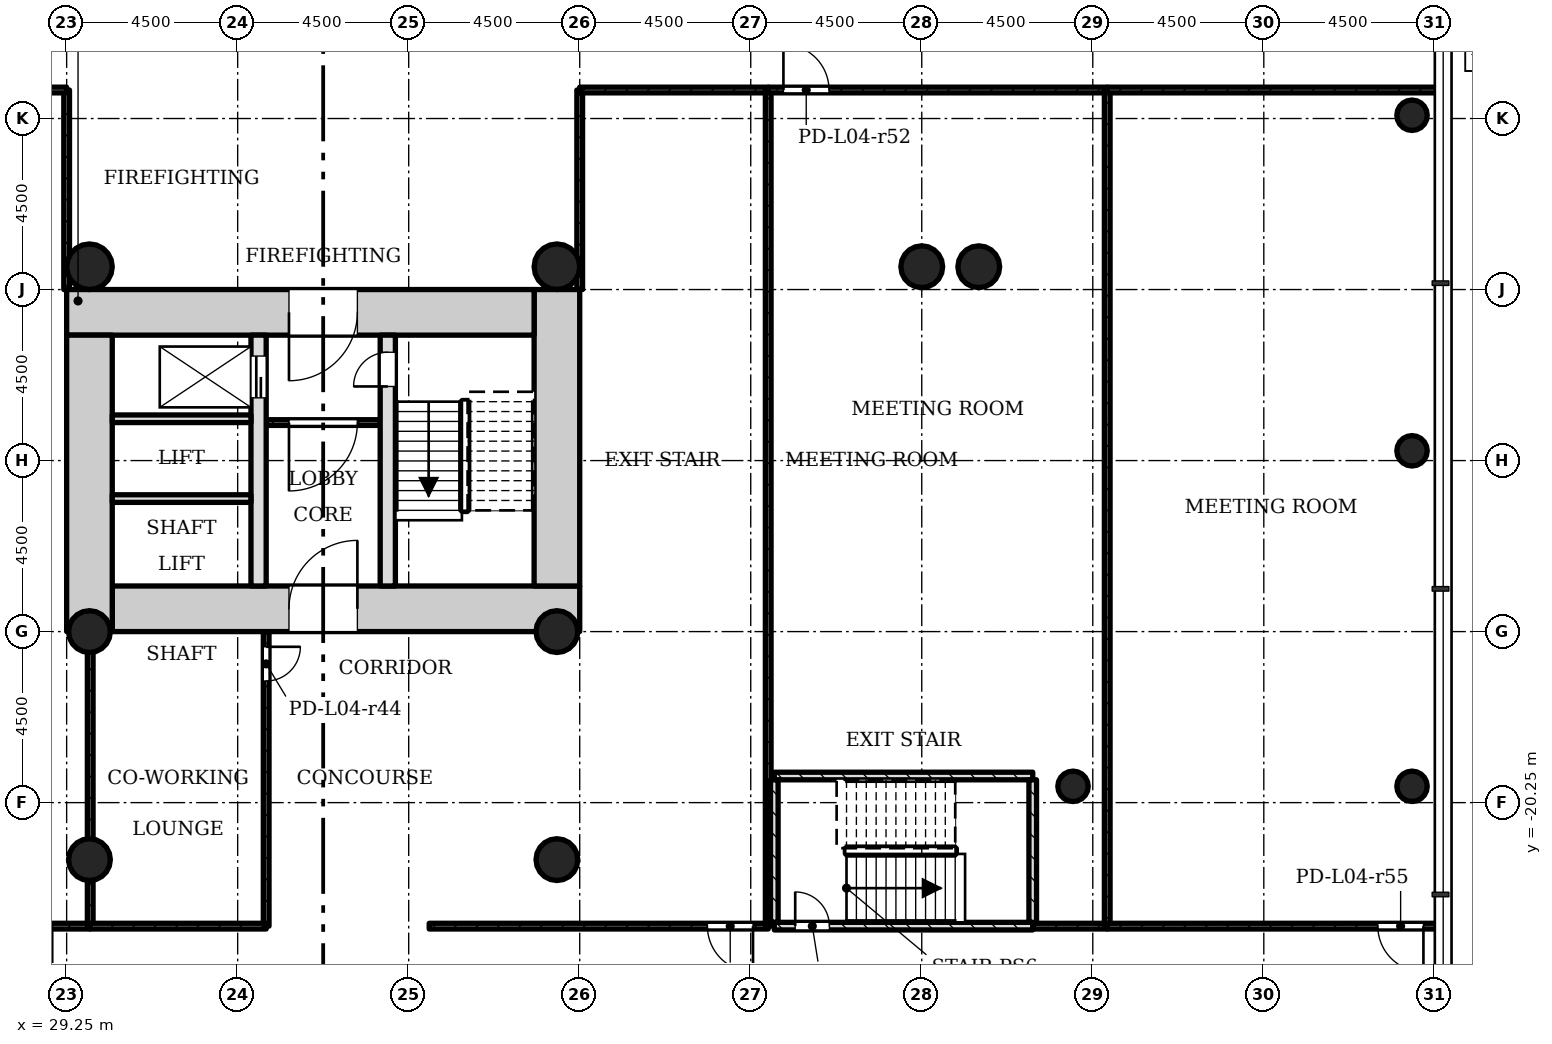
"""IFC4 building model, lengths in metres.
Left out: names, types, materials, properties, quantities, classifications, styles, units other than length and angle.
Written with IfcOpenShell. Run it as: python <this file> out.ifc"""

import sys

from ifc_helpers import new_model, si_unit, direction, frame, frame_2d, origin, origin_2d, place, context, subcontext, project, spatial, rectangle, hollow_circle, extrude, element, fill, save


model = new_model("IFC4")
c1 = context("Model", 3, precision=1e-05, world=origin(), true_north=direction((0.0, 1.0)))
c2 = subcontext(c1, "Body", "Model", "MODEL_VIEW")
j1 = project(units=[si_unit("LENGTHUNIT", "METRE"), si_unit("PLANEANGLEUNIT", "RADIAN")], contexts=[c1])
p1 = place(None, origin())
s1 = spatial("IfcSite", under=j1, at=p1, CompositionType="ELEMENT")
p2 = place(p1, origin())
s2 = spatial("IfcBuilding", under=s1, at=p2, CompositionType="ELEMENT")
p3 = place(p2, frame((0.0, 0.0, 20.0)))
s3 = spatial("IfcBuildingStorey", under=s2, at=p3, CompositionType="ELEMENT", Elevation=20.0)
p4 = place(p3, frame((30.45, -15.15, 0.0), z_axis=(0.0, 0.0, 1.0), x_axis=(1.0, 0.0, 0.0)))
e1 = element("IfcWall", 1, at=p4, inside=s3, PredefinedType="SHEAR", context=c2, shape_type="SweptSolid", body=[
    extrude(rectangle(XDim=12.3, YDim=1.2, at=frame_2d((6.15, 0.0))), origin(), (0.0, 0.0, 1.0), 4.5),
])
p5 = place(p4, frame((4.65, 0.0, 0.0)))
e2 = element("IfcOpeningElement", 2, at=p5, cuts=e1, PredefinedType="OPENING", context=c2, shape_type="SweptSolid", body=[
    extrude(rectangle(XDim=1.8, YDim=2.1, at=frame_2d((0.9, 1.05))), frame((0.0, 0.61, 0.0), z_axis=(0.0, -1.0, 0.0), x_axis=(1.0, 0.0, 0.0)), (0.0, 0.0, 1.0), 1.22),
])
p6 = place(p3, frame((42.15, -14.55, 0.0), z_axis=(0.0, 0.0, 1.0), x_axis=(0.0, 1.0, 0.0)))
e3 = element("IfcWall", 3, at=p6, inside=s3, PredefinedType="SHEAR", context=c2, shape_type="SweptSolid", body=[
    extrude(rectangle(XDim=7.8, YDim=1.2, at=frame_2d((3.9, 0.0))), origin(), (0.0, 0.0, 1.0), 4.5),
])
p7 = place(p3, frame((41.55, -7.35, 0.0), z_axis=(0.0, 0.0, 1.0), x_axis=(-1.0, 0.0, 0.0)))
e4 = element("IfcWall", 4, at=p7, inside=s3, PredefinedType="SHEAR", context=c2, shape_type="SweptSolid", body=[
    extrude(rectangle(XDim=12.3, YDim=1.2, at=frame_2d((6.15, 0.0))), origin(), (0.0, 0.0, 1.0), 4.5),
])
p8 = place(p7, frame((4.65, 0.0, 0.0)))
e5 = element("IfcOpeningElement", 5, at=p8, cuts=e4, PredefinedType="OPENING", context=c2, shape_type="SweptSolid", body=[
    extrude(rectangle(XDim=1.8, YDim=2.1, at=frame_2d((0.9, 1.05))), frame((0.0, 0.61, 0.0), z_axis=(0.0, -1.0, 0.0), x_axis=(1.0, 0.0, 0.0)), (0.0, 0.0, 1.0), 1.22),
])
p9 = place(p3, frame((29.85, -7.95, 0.0), z_axis=(0.0, 0.0, 1.0), x_axis=(0.0, -1.0, 0.0)))
e6 = element("IfcWall", 6, at=p9, inside=s3, PredefinedType="SHEAR", context=c2, shape_type="SweptSolid", body=[
    extrude(rectangle(XDim=7.8, YDim=1.2, at=frame_2d((3.9, 0.0))), origin(), (0.0, 0.0, 1.0), 4.5),
])
p10 = place(p3, frame((34.3, -14.55, 0.0), z_axis=(0.0, 0.0, 1.0), x_axis=(0.0, 1.0, 0.0)))
e7 = element("IfcWall", 7, at=p10, inside=s3, PredefinedType="SHEAR", context=c2, shape_type="SweptSolid", body=[
    extrude(rectangle(XDim=6.6, YDim=0.4, at=frame_2d((3.3, 0.0))), origin(), (0.0, 0.0, 1.0), 4.5),
])
p11 = place(p10, frame((4.95, 0.0, 0.0)))
e8 = element("IfcOpeningElement", 8, at=p11, cuts=e7, PredefinedType="OPENING", context=c2, shape_type="SweptSolid", body=[
    extrude(rectangle(XDim=1.1, YDim=2.1, at=frame_2d((0.55, 1.05))), frame((0.0, 0.21, 0.0), z_axis=(0.0, -1.0, 0.0), x_axis=(1.0, 0.0, 0.0)), (0.0, 0.0, 1.0), 0.42),
])
p12 = place(p3, frame((37.7, -14.55, 0.0), z_axis=(0.0, 0.0, 1.0), x_axis=(0.0, 1.0, 0.0)))
e9 = element("IfcWall", 9, at=p12, inside=s3, PredefinedType="SHEAR", context=c2, shape_type="SweptSolid", body=[
    extrude(rectangle(XDim=6.6, YDim=0.4, at=frame_2d((3.3, 0.0))), origin(), (0.0, 0.0, 1.0), 4.5),
])
p13 = place(p12, frame((5.25, 0.0, 0.0)))
e10 = element("IfcOpeningElement", 10, at=p13, cuts=e9, PredefinedType="OPENING", context=c2, shape_type="SweptSolid", body=[
    extrude(rectangle(XDim=0.9, YDim=2.1, at=frame_2d((0.45, 1.05))), frame((0.0, 0.21, 0.0), z_axis=(0.0, -1.0, 0.0), x_axis=(1.0, 0.0, 0.0)), (0.0, 0.0, 1.0), 0.42),
])
for number, where, z_axis, x_axis in (
    (11, (42.15, -15.75, 0.0), (0.0, 0.0, 1.0), (1.0, 0.0, 0.0)),
    (12, (29.85, -15.75, 0.0), (0.0, 0.0, 1.0), (1.0, 0.0, 0.0)),
    (13, (42.15, -21.75, 0.0), (0.0, 0.0, 1.0), (1.0, 0.0, 0.0)),
    (14, (29.85, -21.75, 0.0), (0.0, 0.0, 1.0), (1.0, 0.0, 0.0)),
    (15, (51.75, -6.15, 0.0), (0.0, 0.0, 1.0), (1.0, 0.0, 0.0)),
    (16, (53.25, -6.15, 0.0), (0.0, 0.0, 1.0), (1.0, 0.0, 0.0)),
):
    element("IfcColumn", number, at=place(p3, frame(where, z_axis=z_axis, x_axis=x_axis)), inside=s3, PredefinedType="COLUMN", context=c2, shape_type="SweptSolid", body=[
        extrude(hollow_circle(Radius=0.55, WallThickness=0.04, at=origin_2d()), origin(), (0.0, 0.0, 1.0), 4.5),
    ])
for number, where, z_axis, x_axis in (
    (17, (42.15, -6.15, 0.0), (0.0, 0.0, 1.0), (1.0, 0.0, 0.0)),
    (18, (29.85, -6.15, 0.0), (0.0, 0.0, 1.0), (1.0, 0.0, 0.0)),
):
    element("IfcColumn", number, at=place(p3, frame(where, z_axis=z_axis, x_axis=x_axis)), inside=s3, PredefinedType="COLUMN", context=c2, shape_type="SweptSolid", body=[
        extrude(hollow_circle(Radius=0.6, WallThickness=0.045, at=origin_2d()), origin(), (0.0, 0.0, 1.0), 4.5),
    ])
for number, where, z_axis, x_axis in (
    (19, (55.73, -19.821, 0.0), (0.0, 0.0, 1.0), (1.0, 0.0, 0.0)),
    (20, (64.65, -19.821, 0.0), (0.0, 0.0, 1.0), (1.0, 0.0, 0.0)),
    (21, (64.65, -10.993, 0.0), (0.0, 0.0, 1.0), (1.0, 0.0, 0.0)),
    (22, (64.65, -2.164, 0.0), (0.0, 0.0, 1.0), (1.0, 0.0, 0.0)),
):
    element("IfcColumn", number, at=place(p3, frame(where, z_axis=z_axis, x_axis=x_axis)), inside=s3, PredefinedType="COLUMN", context=c2, shape_type="SweptSolid", body=[
        extrude(hollow_circle(Radius=0.4, WallThickness=0.028, at=origin_2d()), origin(), (0.0, 0.0, 1.0), 4.08),
    ])
p14 = place(p3, frame((34.5, -10.25, 0.0), z_axis=(0.0, 0.0, 1.0), x_axis=(1.0, 0.0, 0.0)))
e23 = element("IfcWall", 23, at=p14, inside=s3, PredefinedType="PARTITIONING", context=c2, shape_type="SweptSolid", body=[
    extrude(rectangle(XDim=3.0, YDim=0.15, at=frame_2d((1.5, 0.0))), origin(), (0.0, 0.0, 1.0), 4.075),
])
p15 = place(p14, frame((0.6, 0.0, 0.0)))
e24 = element("IfcOpeningElement", 24, at=p15, cuts=e23, PredefinedType="OPENING", context=c2, shape_type="SweptSolid", body=[
    extrude(rectangle(XDim=1.8, YDim=2.1, at=frame_2d((0.9, 1.05))), frame((0.0, 0.085, 0.0), z_axis=(0.0, -1.0, 0.0), x_axis=(1.0, 0.0, 0.0)), (0.0, 0.0, 1.0), 0.17),
])
for number, where, z_axis, x_axis in (
    (25, (30.45, -10.15, 0.0), (0.0, 0.0, 1.0), (1.0, 0.0, 0.0)),
    (26, (30.45, -12.25, 0.0), (0.0, 0.0, 1.0), (1.0, 0.0, 0.0)),
):
    element("IfcWall", number, at=place(p3, frame(where, z_axis=z_axis, x_axis=x_axis)), inside=s3, PredefinedType="SOLIDWALL", context=c2, shape_type="SweptSolid", body=[
        extrude(rectangle(XDim=3.65, YDim=0.2, at=frame_2d((1.825, 0.0))), origin(), (0.0, 0.0, 1.0), 4.075),
    ])
p16 = place(p3, frame((29.25, -1.5, 0.0), z_axis=(0.0, 0.0, 1.0), x_axis=(0.0, -1.0, 0.0)))
e27 = element("IfcWall", 27, at=p16, inside=s3, PredefinedType="PARTITIONING", context=c2, shape_type="SweptSolid", body=[
    extrude(rectangle(XDim=5.25, YDim=0.15, at=frame_2d((2.625, 0.0))), origin(), (0.0, 0.0, 1.0), 4.075),
])
p17 = place(p3, frame((29.87, -23.5, 0.0), z_axis=(0.0, 0.0, 1.0), x_axis=(-1.0, 0.0, 0.0)))
e28 = element("IfcWall", 28, at=p17, inside=s3, PredefinedType="PARTITIONING", context=c2, shape_type="SweptSolid", body=[
    extrude(rectangle(XDim=8.92, YDim=0.15, at=frame_2d((4.46, 0.0))), origin(), (0.0, 0.0, 1.0), 4.075),
])
p18 = place(p17, frame((1.0, 0.0, 0.0)))
e29 = element("IfcOpeningElement", 29, at=p18, cuts=e28, PredefinedType="OPENING", context=c2, shape_type="SweptSolid", body=[
    extrude(rectangle(XDim=1.2, YDim=2.1, at=frame_2d((0.6, 1.05))), frame((0.0, 0.085, 0.0), z_axis=(0.0, -1.0, 0.0), x_axis=(1.0, 0.0, 0.0)), (0.0, 0.0, 1.0), 0.17),
])
p19 = place(p3, frame((20.95, -1.5, 0.0), z_axis=(0.0, 0.0, 1.0), x_axis=(1.0, 0.0, 0.0)))
e30 = element("IfcWall", 30, at=p19, inside=s3, PredefinedType="PARTITIONING", context=c2, shape_type="SweptSolid", body=[
    extrude(rectangle(XDim=8.3, YDim=0.15, at=frame_2d((4.15, 0.0))), origin(), (0.0, 0.0, 1.0), 4.075),
])
p20 = place(p3, frame((29.87, -15.75, 0.0), z_axis=(0.0, 0.0, 1.0), x_axis=(0.0, -1.0, 0.0)))
e31 = element("IfcWall", 31, at=p20, inside=s3, PredefinedType="PARTITIONING", context=c2, shape_type="SweptSolid", body=[
    extrude(rectangle(XDim=6.0, YDim=0.15, at=frame_2d((3.0, 0.0))), origin(), (0.0, 0.0, 1.0), 3.65),
])
p21 = place(p3, frame((29.87, -21.75, 0.0), z_axis=(0.0, 0.0, 1.0), x_axis=(0.0, -1.0, 0.0)))
e32 = element("IfcWall", 32, at=p21, inside=s3, PredefinedType="PARTITIONING", context=c2, shape_type="SweptSolid", body=[
    extrude(rectangle(XDim=1.75, YDim=0.15, at=frame_2d((0.875, 0.0))), origin(), (0.0, 0.0, 1.0), 4.075),
])
p22 = place(p3, frame((34.5, -15.75, 0.0), z_axis=(0.0, 0.0, 1.0), x_axis=(0.0, -1.0, 0.0)))
e33 = element("IfcWall", 33, at=p22, inside=s3, PredefinedType="PARTITIONING", context=c2, shape_type="SweptSolid", body=[
    extrude(rectangle(XDim=7.75, YDim=0.15, at=frame_2d((3.875, 0.0))), origin(), (0.0, 0.0, 1.0), 4.075),
])
p23 = place(p22, frame((0.4, 0.0, 0.0)))
e34 = element("IfcOpeningElement", 34, at=p23, cuts=e33, PredefinedType="OPENING", context=c2, shape_type="SweptSolid", body=[
    extrude(rectangle(XDim=0.9, YDim=2.1, at=frame_2d((0.45, 1.05))), frame((0.0, 0.085, 0.0), z_axis=(0.0, -1.0, 0.0), x_axis=(1.0, 0.0, 0.0)), (0.0, 0.0, 1.0), 0.17),
])
p24 = place(p3, frame((34.5, -23.5, 0.0), z_axis=(0.0, 0.0, 1.0), x_axis=(-1.0, 0.0, 0.0)))
e35 = element("IfcWall", 35, at=p24, inside=s3, PredefinedType="PARTITIONING", context=c2, shape_type="SweptSolid", body=[
    extrude(rectangle(XDim=4.63, YDim=0.15, at=frame_2d((2.315, 0.0))), origin(), (0.0, 0.0, 1.0), 4.075),
])
p25 = place(p3, frame((42.75, -6.75, 0.0), z_axis=(0.0, 0.0, 1.0), x_axis=(0.0, 1.0, 0.0)))
e36 = element("IfcWall", 36, at=p25, inside=s3, PredefinedType="PARTITIONING", context=c2, shape_type="SweptSolid", body=[
    extrude(rectangle(XDim=5.25, YDim=0.15, at=frame_2d((2.625, 0.0))), origin(), (0.0, 0.0, 1.0), 4.075),
])
p26 = place(p3, frame((42.75, -1.5, 0.0), z_axis=(0.0, 0.0, 1.0), x_axis=(1.0, 0.0, 0.0)))
e37 = element("IfcWall", 37, at=p26, inside=s3, PredefinedType="PARTITIONING", context=c2, shape_type="SweptSolid", body=[
    extrude(rectangle(XDim=4.96, YDim=0.15, at=frame_2d((2.48, 0.0))), origin(), (0.0, 0.0, 1.0), 4.075),
])
p27 = place(p3, frame((47.71, -23.5, 0.0), z_axis=(0.0, 0.0, 1.0), x_axis=(-1.0, 0.0, 0.0)))
e38 = element("IfcWall", 38, at=p27, inside=s3, PredefinedType="PARTITIONING", context=c2, shape_type="SweptSolid", body=[
    extrude(rectangle(XDim=8.92, YDim=0.15, at=frame_2d((4.46, 0.0))), origin(), (0.0, 0.0, 1.0), 4.075),
])
p28 = place(p27, frame((0.4, 0.0, 0.0)))
e39 = element("IfcOpeningElement", 39, at=p28, cuts=e38, PredefinedType="OPENING", context=c2, shape_type="SweptSolid", body=[
    extrude(rectangle(XDim=1.2, YDim=2.1, at=frame_2d((0.6, 1.05))), frame((0.0, 0.085, 0.0), z_axis=(0.0, -1.0, 0.0), x_axis=(1.0, 0.0, 0.0)), (0.0, 0.0, 1.0), 0.17),
])
p29 = place(p3, frame((47.71, -1.5, 0.0), z_axis=(0.0, 0.0, 1.0), x_axis=(0.0, -1.0, 0.0)))
e40 = element("IfcWall", 40, at=p29, inside=s3, PredefinedType="PARTITIONING", context=c2, shape_type="SweptSolid", body=[
    extrude(rectangle(XDim=22.0, YDim=0.15, at=frame_2d((11.0, 0.0))), origin(), (0.0, 0.0, 1.0), 4.075),
])
p30 = place(p3, frame((56.63, -23.5, 0.0), z_axis=(0.0, 0.0, 1.0), x_axis=(-1.0, 0.0, 0.0)))
e41 = element("IfcWall", 41, at=p30, inside=s3, PredefinedType="PARTITIONING", context=c2, shape_type="SweptSolid", body=[
    extrude(rectangle(XDim=1.96, YDim=0.15, at=frame_2d((0.98, 0.0))), origin(), (0.0, 0.0, 1.0), 4.075),
])
p31 = place(p3, frame((47.71, -1.5, 0.0), z_axis=(0.0, 0.0, 1.0), x_axis=(1.0, 0.0, 0.0)))
e42 = element("IfcWall", 42, at=p31, inside=s3, PredefinedType="PARTITIONING", context=c2, shape_type="SweptSolid", body=[
    extrude(rectangle(XDim=8.92, YDim=0.15, at=frame_2d((4.46, 0.0))), origin(), (0.0, 0.0, 1.0), 4.075),
])
p32 = place(p31, frame((0.4, 0.0, 0.0)))
e43 = element("IfcOpeningElement", 43, at=p32, cuts=e42, PredefinedType="OPENING", context=c2, shape_type="SweptSolid", body=[
    extrude(rectangle(XDim=1.2, YDim=2.1, at=frame_2d((0.6, 1.05))), frame((0.0, 0.085, 0.0), z_axis=(0.0, -1.0, 0.0), x_axis=(1.0, 0.0, 0.0)), (0.0, 0.0, 1.0), 0.17),
])
p33 = place(p3, frame((56.63, -1.5, 0.0), z_axis=(0.0, 0.0, 1.0), x_axis=(0.0, -1.0, 0.0)))
e44 = element("IfcWall", 44, at=p33, inside=s3, PredefinedType="PARTITIONING", context=c2, shape_type="SweptSolid", body=[
    extrude(rectangle(XDim=22.0, YDim=0.15, at=frame_2d((11.0, 0.0))), origin(), (0.0, 0.0, 1.0), 4.075),
])
p34 = place(p3, frame((65.35, -23.5, 0.0), z_axis=(0.0, 0.0, 1.0), x_axis=(-1.0, 0.0, 0.0)))
e45 = element("IfcWall", 45, at=p34, inside=s3, PredefinedType="PARTITIONING", context=c2, shape_type="SweptSolid", body=[
    extrude(rectangle(XDim=8.72, YDim=0.15, at=frame_2d((4.36, 0.0))), origin(), (0.0, 0.0, 1.0), 4.075),
])
p35 = place(p34, frame((0.4, 0.0, 0.0)))
e46 = element("IfcOpeningElement", 46, at=p35, cuts=e45, PredefinedType="OPENING", context=c2, shape_type="SweptSolid", body=[
    extrude(rectangle(XDim=1.2, YDim=2.1, at=frame_2d((0.6, 1.05))), frame((0.0, 0.085, 0.0), z_axis=(0.0, -1.0, 0.0), x_axis=(1.0, 0.0, 0.0)), (0.0, 0.0, 1.0), 0.17),
])
p36 = place(p3, frame((56.63, -1.5, 0.0), z_axis=(0.0, 0.0, 1.0), x_axis=(1.0, 0.0, 0.0)))
e47 = element("IfcWall", 47, at=p36, inside=s3, PredefinedType="PARTITIONING", context=c2, shape_type="SweptSolid", body=[
    extrude(rectangle(XDim=8.72, YDim=0.15, at=frame_2d((4.36, 0.0))), origin(), (0.0, 0.0, 1.0), 4.075),
])
p37 = place(p3, frame((47.87, -23.5, 0.0), z_axis=(0.0, 0.0, 1.0), x_axis=(1.0, 0.0, 0.0)))
e48 = element("IfcWall", 48, at=p37, inside=s3, PredefinedType="SHEAR", context=c2, shape_type="SweptSolid", body=[
    extrude(rectangle(XDim=6.8, YDim=0.2, at=frame_2d((3.4, 0.0))), origin(), (0.0, 0.0, 1.0), 4.075),
])
p38 = place(p37, frame((0.55, 0.0, 0.0)))
e49 = element("IfcOpeningElement", 49, at=p38, cuts=e48, PredefinedType="OPENING", context=c2, shape_type="SweptSolid", body=[
    extrude(rectangle(XDim=0.9, YDim=2.1, at=frame_2d((0.45, 1.05))), frame((0.0, 0.11, 0.0), z_axis=(0.0, -1.0, 0.0), x_axis=(1.0, 0.0, 0.0)), (0.0, 0.0, 1.0), 0.22),
])
p39 = place(p3, frame((47.87, -19.55, 0.0), z_axis=(0.0, 0.0, 1.0), x_axis=(1.0, 0.0, 0.0)))
e50 = element("IfcWall", 50, at=p39, inside=s3, PredefinedType="SHEAR", context=c2, shape_type="SweptSolid", body=[
    extrude(rectangle(XDim=6.8, YDim=0.2, at=frame_2d((3.4, 0.0))), origin(), (0.0, 0.0, 1.0), 4.075),
])
for number, where, z_axis, x_axis in (
    (51, (47.87, -23.4, 0.0), (0.0, 0.0, 1.0), (0.0, 1.0, 0.0)),
    (52, (54.67, -23.4, 0.0), (0.0, 0.0, 1.0), (0.0, 1.0, 0.0)),
):
    element("IfcWall", number, at=place(p3, frame(where, z_axis=z_axis, x_axis=x_axis)), inside=s3, PredefinedType="SHEAR", context=c2, shape_type="SweptSolid", body=[
        extrude(rectangle(XDim=3.75, YDim=0.2, at=frame_2d((1.875, 0.0))), origin(), (0.0, 0.0, 1.0), 4.075),
    ])
p40 = place(p15, origin())
e53 = element("IfcDoor", 53, at=p40, inside=s3, OperationType="SINGLE_SWING_LEFT", PredefinedType="DOOR", context=c2, shape_type="SweptSolid", body=[
    extrude(rectangle(XDim=1.8, YDim=2.1, at=frame_2d((0.9, 1.05))), frame((0.0, 0.025, 0.0), z_axis=(0.0, -1.0, 0.0), x_axis=(1.0, 0.0, 0.0)), (0.0, 0.0, 1.0), 0.05),
])
fill(e24, e53)
p41 = place(p23, origin())
e54 = element("IfcDoor", 54, at=p41, inside=s3, OperationType="SINGLE_SWING_RIGHT", PredefinedType="DOOR", context=c2, shape_type="SweptSolid", body=[
    extrude(rectangle(XDim=0.9, YDim=2.1, at=frame_2d((0.45, 1.05))), frame((0.0, 0.025, 0.0), z_axis=(0.0, -1.0, 0.0), x_axis=(1.0, 0.0, 0.0)), (0.0, 0.0, 1.0), 0.05),
])
fill(e34, e54)
p42 = place(p28, origin())
e55 = element("IfcDoor", 55, at=p42, inside=s3, OperationType="SINGLE_SWING_RIGHT", PredefinedType="DOOR", context=c2, shape_type="SweptSolid", body=[
    extrude(rectangle(XDim=1.2, YDim=2.1, at=frame_2d((0.6, 1.05))), frame((0.0, 0.025, 0.0), z_axis=(0.0, -1.0, 0.0), x_axis=(1.0, 0.0, 0.0)), (0.0, 0.0, 1.0), 0.05),
])
fill(e39, e55)
p43 = place(p32, origin())
e56 = element("IfcDoor", 56, at=p43, inside=s3, OperationType="SINGLE_SWING_RIGHT", PredefinedType="DOOR", context=c2, shape_type="SweptSolid", body=[
    extrude(rectangle(XDim=1.2, YDim=2.1, at=frame_2d((0.6, 1.05))), frame((0.0, 0.025, 0.0), z_axis=(0.0, -1.0, 0.0), x_axis=(1.0, 0.0, 0.0)), (0.0, 0.0, 1.0), 0.05),
])
fill(e43, e56)
p44 = place(p35, origin())
e57 = element("IfcDoor", 57, at=p44, inside=s3, OperationType="SINGLE_SWING_RIGHT", PredefinedType="DOOR", context=c2, shape_type="SweptSolid", body=[
    extrude(rectangle(XDim=1.2, YDim=2.1, at=frame_2d((0.6, 1.05))), frame((0.0, 0.025, 0.0), z_axis=(0.0, -1.0, 0.0), x_axis=(1.0, 0.0, 0.0)), (0.0, 0.0, 1.0), 0.05),
])
fill(e46, e57)
p45 = place(p38, origin())
e58 = element("IfcDoor", 58, at=p45, inside=s3, OperationType="SINGLE_SWING_RIGHT", PredefinedType="DOOR", context=c2, shape_type="SweptSolid", body=[
    extrude(rectangle(XDim=0.9, YDim=2.1, at=frame_2d((0.45, 1.05))), frame((0.0, 0.025, 0.0), z_axis=(0.0, -1.0, 0.0), x_axis=(1.0, 0.0, 0.0)), (0.0, 0.0, 1.0), 0.05),
])
fill(e49, e58)
p46 = place(p13, origin())
e59 = element("IfcDoor", 59, at=p46, inside=s3, OperationType="SINGLE_SWING_RIGHT", PredefinedType="DOOR", context=c2, shape_type="SweptSolid", body=[
    extrude(rectangle(XDim=0.9, YDim=2.1, at=frame_2d((0.45, 1.05))), frame((0.0, 0.025, 0.0), z_axis=(0.0, -1.0, 0.0), x_axis=(1.0, 0.0, 0.0)), (0.0, 0.0, 1.0), 0.05),
])
fill(e10, e59)
p47 = place(p11, origin())
e60 = element("IfcDoor", 60, at=p47, inside=s3, OperationType="SLIDING_TO_LEFT", PredefinedType="DOOR", context=c2, shape_type="SweptSolid", body=[
    extrude(rectangle(XDim=1.1, YDim=2.1, at=frame_2d((0.55, 1.05))), frame((0.0, 0.025, 0.0), z_axis=(0.0, -1.0, 0.0), x_axis=(1.0, 0.0, 0.0)), (0.0, 0.0, 1.0), 0.05),
])
fill(e8, e60)
p48 = place(p8, origin())
e61 = element("IfcDoor", 61, at=p48, inside=s3, OperationType="SINGLE_SWING_LEFT", PredefinedType="DOOR", context=c2, shape_type="SweptSolid", body=[
    extrude(rectangle(XDim=1.8, YDim=2.1, at=frame_2d((0.9, 1.05))), frame((0.0, 0.025, 0.0), z_axis=(0.0, -1.0, 0.0), x_axis=(1.0, 0.0, 0.0)), (0.0, 0.0, 1.0), 0.05),
])
fill(e5, e61)
p49 = place(p5, origin())
e62 = element("IfcDoor", 62, at=p49, inside=s3, OperationType="SINGLE_SWING_LEFT", PredefinedType="DOOR", context=c2, shape_type="SweptSolid", body=[
    extrude(rectangle(XDim=1.8, YDim=2.1, at=frame_2d((0.9, 1.05))), frame((0.0, 0.025, 0.0), z_axis=(0.0, -1.0, 0.0), x_axis=(1.0, 0.0, 0.0)), (0.0, 0.0, 1.0), 0.05),
])
fill(e2, e62)
save(model, sys.argv[1])
